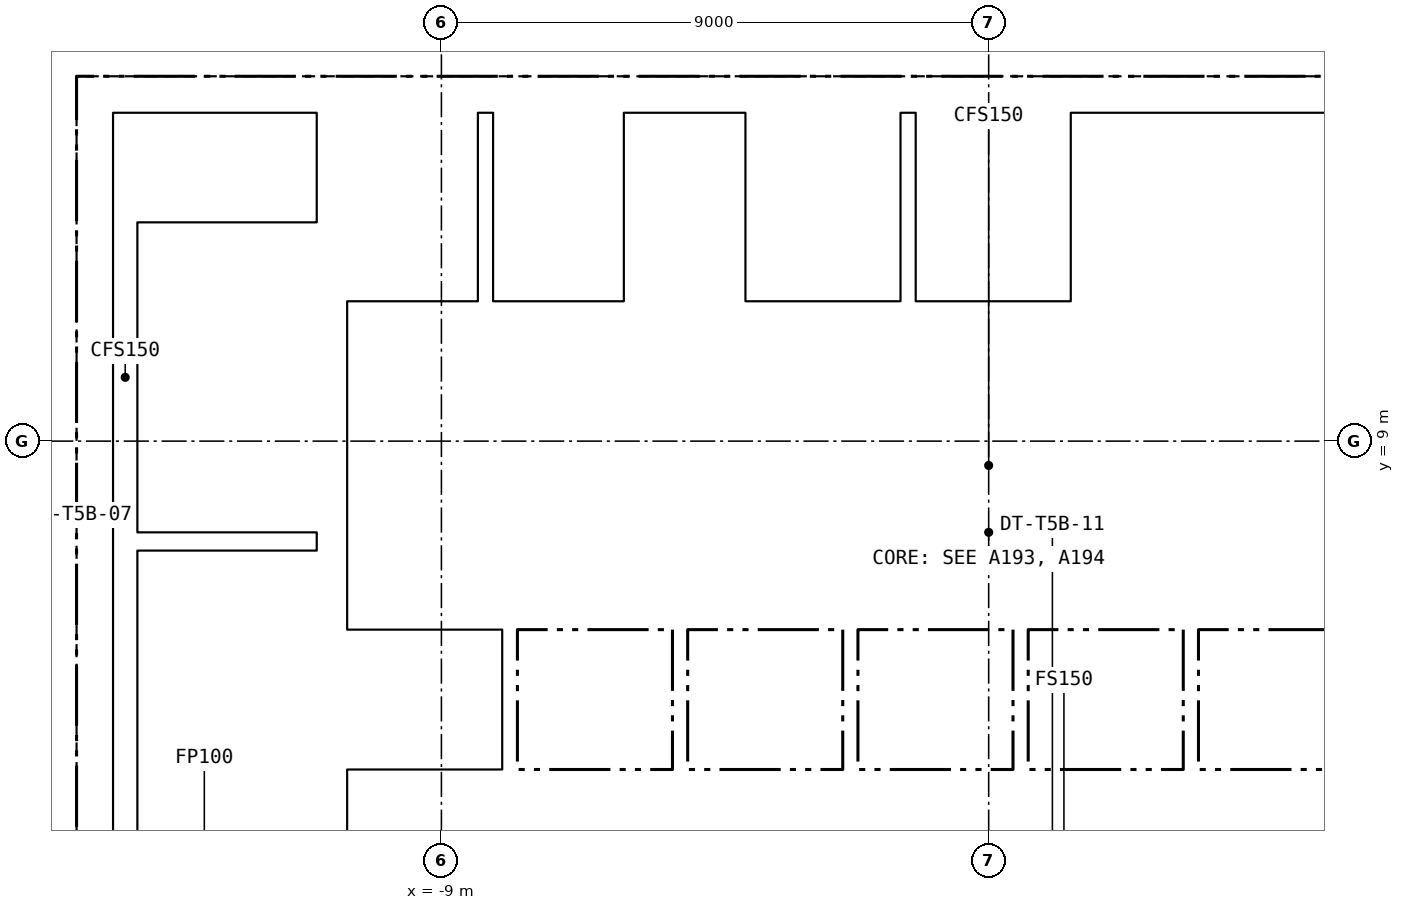
"""IFC4 building model, lengths in metres.
Left out: names, types, materials, properties, quantities, classifications, styles, units other than length and angle.
Written with IfcOpenShell. Run it as: python <this file> out.ifc"""

import sys

from ifc_helpers import new_model, si_unit, direction, frame, frame_2d, origin, place, context, subcontext, project, spatial, rectangle, extrude, element, fill, save


model = new_model("IFC4")
c1 = context("Model", 3, precision=1e-05, world=origin(), true_north=direction((0.0, 1.0)))
c2 = subcontext(c1, "Body", "Model", "MODEL_VIEW")
j1 = project(units=[si_unit("LENGTHUNIT", "METRE"), si_unit("PLANEANGLEUNIT", "RADIAN")], contexts=[c1])
p1 = place(None, origin())
s1 = spatial("IfcSite", under=j1, at=p1, CompositionType="ELEMENT")
p2 = place(p1, origin())
s2 = spatial("IfcBuilding", under=s1, at=p2, CompositionType="ELEMENT")
p3 = place(p2, frame((0.0, 0.0, 227.25)))
s3 = spatial("IfcBuildingStorey", under=s2, at=p3, CompositionType="ELEMENT", Elevation=227.25)
p4 = place(p3, frame((-15.0, 14.7, -0.15), z_axis=(0.0, 0.0, 1.0), x_axis=(1.0, 0.0, 0.0)))
e1 = element("IfcWall", 1, at=p4, inside=s3, PredefinedType="SOLIDWALL", context=c2, shape_type="SweptSolid", body=[
    extrude(rectangle(XDim=30.0, YDim=0.6, at=frame_2d((15.0, 0.0))), origin(), (0.0, 0.0, 1.0), 3.65),
])
p5 = place(p4, frame((9.25, 0.0, 0.15)))
e2 = element("IfcOpeningElement", 2, at=p5, cuts=e1, PredefinedType="OPENING", context=c2, shape_type="SweptSolid", body=[
    extrude(rectangle(XDim=1.5, YDim=2.1, at=frame_2d((0.75, 1.05))), frame((0.0, 0.31, 0.0), z_axis=(0.0, -1.0, 0.0), x_axis=(1.0, 0.0, 0.0)), (0.0, 0.0, 1.0), 0.62),
])
p6 = place(p4, frame((19.4, 0.0, 0.15)))
e3 = element("IfcOpeningElement", 3, at=p6, cuts=e1, PredefinedType="OPENING", context=c2, shape_type="SweptSolid", body=[
    extrude(rectangle(XDim=1.5, YDim=2.1, at=frame_2d((0.75, 1.05))), frame((0.0, 0.31, 0.0), z_axis=(0.0, -1.0, 0.0), x_axis=(1.0, 0.0, 0.0)), (0.0, 0.0, 1.0), 0.62),
])
p7 = place(p4, frame((1.5, 0.0, 0.15)))
e4 = element("IfcOpeningElement", 4, at=p7, cuts=e1, PredefinedType="OPENING", context=c2, shape_type="SweptSolid", body=[
    extrude(rectangle(XDim=1.2, YDim=2.1, at=frame_2d((0.6, 1.05))), frame((0.0, 0.31, 0.0), z_axis=(0.0, -1.0, 0.0), x_axis=(1.0, 0.0, 0.0)), (0.0, 0.0, 1.0), 0.62),
])
p8 = place(p4, frame((27.3, 0.0, 0.15)))
e5 = element("IfcOpeningElement", 5, at=p8, cuts=e1, PredefinedType="OPENING", context=c2, shape_type="SweptSolid", body=[
    extrude(rectangle(XDim=1.2, YDim=2.1, at=frame_2d((0.6, 1.05))), frame((0.0, 0.31, 0.0), z_axis=(0.0, -1.0, 0.0), x_axis=(1.0, 0.0, 0.0)), (0.0, 0.0, 1.0), 0.62),
])
p9 = place(p3, frame((-14.7, 0.6, -0.15), z_axis=(0.0, 0.0, 1.0), x_axis=(0.0, 1.0, 0.0)))
e6 = element("IfcWall", 6, at=p9, inside=s3, PredefinedType="SOLIDWALL", context=c2, shape_type="SweptSolid", body=[
    extrude(rectangle(XDim=13.8, YDim=0.6, at=frame_2d((6.9, 0.0))), origin(), (0.0, 0.0, 1.0), 3.65),
])
p10 = place(p3, frame((-10.8, 0.6, -0.15), z_axis=(0.0, 0.0, 1.0), x_axis=(0.0, 1.0, 0.0)))
e7 = element("IfcWall", 7, at=p10, inside=s3, PredefinedType="SOLIDWALL", context=c2, shape_type="SweptSolid", body=[
    extrude(rectangle(XDim=13.8, YDim=0.5, at=frame_2d((6.9, 0.0))), origin(), (0.0, 0.0, 1.0), 3.65),
])
p11 = place(p3, frame((-10.55, 3.5, 0.0), z_axis=(0.0, 0.0, 1.0), x_axis=(1.0, 0.0, 0.0)))
e8 = element("IfcWall", 8, at=p11, inside=s3, PredefinedType="PARTITIONING", context=c2, shape_type="SweptSolid", body=[
    extrude(rectangle(XDim=21.1, YDim=0.2, at=frame_2d((10.55, 0.0))), origin(), (0.0, 0.0, 1.0), 3.5),
])
p12 = place(p11, frame((0.675, 0.0, 0.0)))
e9 = element("IfcOpeningElement", 9, at=p12, cuts=e8, PredefinedType="OPENING", context=c2, shape_type="SweptSolid", body=[
    extrude(rectangle(XDim=1.2, YDim=2.1, at=frame_2d((0.6, 1.05))), frame((0.0, 0.11, 0.0), z_axis=(0.0, -1.0, 0.0), x_axis=(1.0, 0.0, 0.0)), (0.0, 0.0, 1.0), 0.22),
])
p13 = place(p11, frame((3.475, 0.0, 0.0)))
e10 = element("IfcOpeningElement", 10, at=p13, cuts=e8, PredefinedType="OPENING", context=c2, shape_type="SweptSolid", body=[
    extrude(rectangle(XDim=1.2, YDim=2.1, at=frame_2d((0.6, 1.05))), frame((0.0, 0.11, 0.0), z_axis=(0.0, -1.0, 0.0), x_axis=(1.0, 0.0, 0.0)), (0.0, 0.0, 1.0), 0.22),
])
p14 = place(p11, frame((6.275, 0.0, 0.0)))
e11 = element("IfcOpeningElement", 11, at=p14, cuts=e8, PredefinedType="OPENING", context=c2, shape_type="SweptSolid", body=[
    extrude(rectangle(XDim=1.2, YDim=2.1, at=frame_2d((0.6, 1.05))), frame((0.0, 0.11, 0.0), z_axis=(0.0, -1.0, 0.0), x_axis=(1.0, 0.0, 0.0)), (0.0, 0.0, 1.0), 0.22),
])
p15 = place(p11, frame((9.075, 0.0, 0.0)))
e12 = element("IfcOpeningElement", 12, at=p15, cuts=e8, PredefinedType="OPENING", context=c2, shape_type="SweptSolid", body=[
    extrude(rectangle(XDim=1.2, YDim=2.1, at=frame_2d((0.6, 1.05))), frame((0.0, 0.11, 0.0), z_axis=(0.0, -1.0, 0.0), x_axis=(1.0, 0.0, 0.0)), (0.0, 0.0, 1.0), 0.22),
])
p16 = place(p11, frame((11.875, 0.0, 0.0)))
e13 = element("IfcOpeningElement", 13, at=p16, cuts=e8, PredefinedType="OPENING", context=c2, shape_type="SweptSolid", body=[
    extrude(rectangle(XDim=1.2, YDim=2.1, at=frame_2d((0.6, 1.05))), frame((0.0, 0.11, 0.0), z_axis=(0.0, -1.0, 0.0), x_axis=(1.0, 0.0, 0.0)), (0.0, 0.0, 1.0), 0.22),
])
p17 = place(p11, frame((14.675, 0.0, 0.0)))
e14 = element("IfcOpeningElement", 14, at=p17, cuts=e8, PredefinedType="OPENING", context=c2, shape_type="SweptSolid", body=[
    extrude(rectangle(XDim=1.2, YDim=2.1, at=frame_2d((0.6, 1.05))), frame((0.0, 0.11, 0.0), z_axis=(0.0, -1.0, 0.0), x_axis=(1.0, 0.0, 0.0)), (0.0, 0.0, 1.0), 0.22),
])
p18 = place(p11, frame((17.475, 0.0, 0.0)))
e15 = element("IfcOpeningElement", 15, at=p18, cuts=e8, PredefinedType="OPENING", context=c2, shape_type="SweptSolid", body=[
    extrude(rectangle(XDim=1.2, YDim=2.1, at=frame_2d((0.6, 1.05))), frame((0.0, 0.11, 0.0), z_axis=(0.0, -1.0, 0.0), x_axis=(1.0, 0.0, 0.0)), (0.0, 0.0, 1.0), 0.22),
])
p19 = place(p11, frame((19.9, 0.0, 0.0)))
e16 = element("IfcOpeningElement", 16, at=p19, cuts=e8, PredefinedType="OPENING", context=c2, shape_type="SweptSolid", body=[
    extrude(rectangle(XDim=0.9, YDim=2.1, at=frame_2d((0.45, 1.05))), frame((0.0, 0.11, 0.0), z_axis=(0.0, -1.0, 0.0), x_axis=(1.0, 0.0, 0.0)), (0.0, 0.0, 1.0), 0.22),
])
p20 = place(p3, frame((-10.55, 6.025, 0.0), z_axis=(0.0, 0.0, 1.0), x_axis=(1.0, 0.0, 0.0)))
e17 = element("IfcWall", 17, at=p20, inside=s3, PredefinedType="PARTITIONING", context=c2, shape_type="SweptSolid", body=[
    extrude(rectangle(XDim=21.1, YDim=0.25, at=frame_2d((10.55, 0.0))), origin(), (0.0, 0.0, 1.0), 3.5),
])
p21 = place(p3, frame((-4.125, 8.55, 0.0), z_axis=(0.0, 0.0, 1.0), x_axis=(1.0, 0.0, 0.0)))
e18 = element("IfcWall", 18, at=p21, inside=s3, PredefinedType="PARTITIONING", context=c2, shape_type="SweptSolid", body=[
    extrude(rectangle(XDim=14.675, YDim=0.2, at=frame_2d((7.337, 0.0))), origin(), (0.0, 0.0, 1.0), 3.5),
])
p22 = place(p21, frame((2.438, 0.0, 0.0)))
e19 = element("IfcOpeningElement", 19, at=p22, cuts=e18, PredefinedType="OPENING", context=c2, shape_type="SweptSolid", body=[
    extrude(rectangle(XDim=1.0, YDim=2.1, at=frame_2d((0.5, 1.05))), frame((0.0, 0.11, 0.0), z_axis=(0.0, -1.0, 0.0), x_axis=(1.0, 0.0, 0.0)), (0.0, 0.0, 1.0), 0.22),
])
p23 = place(p21, frame((6.775, 0.0, 0.0)))
e20 = element("IfcOpeningElement", 20, at=p23, cuts=e18, PredefinedType="OPENING", context=c2, shape_type="SweptSolid", body=[
    extrude(rectangle(XDim=1.0, YDim=2.1, at=frame_2d((0.5, 1.05))), frame((0.0, 0.11, 0.0), z_axis=(0.0, -1.0, 0.0), x_axis=(1.0, 0.0, 0.0)), (0.0, 0.0, 1.0), 0.22),
])
p24 = place(p21, frame((10.363, 0.0, 0.0)))
e21 = element("IfcOpeningElement", 21, at=p24, cuts=e18, PredefinedType="OPENING", context=c2, shape_type="SweptSolid", body=[
    extrude(rectangle(XDim=1.0, YDim=2.1, at=frame_2d((0.5, 1.05))), frame((0.0, 0.11, 0.0), z_axis=(0.0, -1.0, 0.0), x_axis=(1.0, 0.0, 0.0)), (0.0, 0.0, 1.0), 0.22),
])
p25 = place(p21, frame((13.475, 0.0, 0.0)))
e22 = element("IfcOpeningElement", 22, at=p25, cuts=e18, PredefinedType="OPENING", context=c2, shape_type="SweptSolid", body=[
    extrude(rectangle(XDim=0.9, YDim=2.1, at=frame_2d((0.45, 1.05))), frame((0.0, 0.11, 0.0), z_axis=(0.0, -1.0, 0.0), x_axis=(1.0, 0.0, 0.0)), (0.0, 0.0, 1.0), 0.22),
])
p26 = place(p3, frame((-10.55, 11.2, 0.0), z_axis=(0.0, 0.0, 1.0), x_axis=(1.0, 0.0, 0.0)))
e23 = element("IfcWall", 23, at=p26, inside=s3, PredefinedType="PARTITIONING", context=c2, shape_type="SweptSolid", body=[
    extrude(rectangle(XDim=4.8, YDim=0.2, at=frame_2d((2.4, 0.0))), origin(), (0.0, 0.0, 1.0), 3.5),
])
p27 = place(p26, frame((0.525, 0.0, 0.0)))
e24 = element("IfcOpeningElement", 24, at=p27, cuts=e23, PredefinedType="OPENING", context=c2, shape_type="SweptSolid", body=[
    extrude(rectangle(XDim=1.1, YDim=2.1, at=frame_2d((0.55, 1.05))), frame((0.0, 0.11, 0.0), z_axis=(0.0, -1.0, 0.0), x_axis=(1.0, 0.0, 0.0)), (0.0, 0.0, 1.0), 0.22),
])
p28 = place(p26, frame((2.925, 0.0, 0.0)))
e25 = element("IfcOpeningElement", 25, at=p28, cuts=e23, PredefinedType="OPENING", context=c2, shape_type="SweptSolid", body=[
    extrude(rectangle(XDim=1.1, YDim=2.1, at=frame_2d((0.55, 1.05))), frame((0.0, 0.11, 0.0), z_axis=(0.0, -1.0, 0.0), x_axis=(1.0, 0.0, 0.0)), (0.0, 0.0, 1.0), 0.22),
])
p29 = place(p3, frame((-4.25, 11.2, 0.0), z_axis=(0.0, 0.0, 1.0), x_axis=(1.0, 0.0, 0.0)))
e26 = element("IfcWall", 26, at=p29, inside=s3, PredefinedType="PARTITIONING", context=c2, shape_type="SweptSolid", body=[
    extrude(rectangle(XDim=8.65, YDim=0.2, at=frame_2d((4.325, 0.0))), origin(), (0.0, 0.0, 1.0), 3.5),
])
p30 = place(p29, frame((0.825, 0.0, 0.0)))
e27 = element("IfcOpeningElement", 27, at=p30, cuts=e26, PredefinedType="OPENING", context=c2, shape_type="SweptSolid", body=[
    extrude(rectangle(XDim=1.4, YDim=2.1, at=frame_2d((0.7, 1.05))), frame((0.0, 0.11, 0.0), z_axis=(0.0, -1.0, 0.0), x_axis=(1.0, 0.0, 0.0)), (0.0, 0.0, 1.0), 0.22),
])
p31 = place(p29, frame((3.625, 0.0, 0.0)))
e28 = element("IfcOpeningElement", 28, at=p31, cuts=e26, PredefinedType="OPENING", context=c2, shape_type="SweptSolid", body=[
    extrude(rectangle(XDim=1.4, YDim=2.1, at=frame_2d((0.7, 1.05))), frame((0.0, 0.11, 0.0), z_axis=(0.0, -1.0, 0.0), x_axis=(1.0, 0.0, 0.0)), (0.0, 0.0, 1.0), 0.22),
])
p32 = place(p29, frame((6.675, 0.0, 0.0)))
e29 = element("IfcOpeningElement", 29, at=p32, cuts=e26, PredefinedType="OPENING", context=c2, shape_type="SweptSolid", body=[
    extrude(rectangle(XDim=0.9, YDim=2.1, at=frame_2d((0.45, 1.05))), frame((0.0, 0.11, 0.0), z_axis=(0.0, -1.0, 0.0), x_axis=(1.0, 0.0, 0.0)), (0.0, 0.0, 1.0), 0.22),
])
p33 = place(p3, frame((-4.125, 6.15, 0.0), z_axis=(0.0, 0.0, 1.0), x_axis=(0.0, 1.0, 0.0)))
e30 = element("IfcWall", 30, at=p33, inside=s3, PredefinedType="PARTITIONING", context=c2, shape_type="SweptSolid", body=[
    extrude(rectangle(XDim=4.95, YDim=0.25, at=frame_2d((2.475, 0.0))), origin(), (0.0, 0.0, 1.0), 3.5),
])
p34 = place(p33, frame((3.125, 0.0, 0.0)))
e31 = element("IfcOpeningElement", 31, at=p34, cuts=e30, PredefinedType="OPENING", context=c2, shape_type="SweptSolid", body=[
    extrude(rectangle(XDim=1.2, YDim=2.1, at=frame_2d((0.6, 1.05))), frame((0.0, 0.135, 0.0), z_axis=(0.0, -1.0, 0.0), x_axis=(1.0, 0.0, 0.0)), (0.0, 0.0, 1.0), 0.27),
])
for number, where, z_axis, x_axis in (
    (32, (-7.875, 3.6, 0.0), (0.0, 0.0, 1.0), (0.0, 1.0, 0.0)),
    (33, (-5.075, 3.6, 0.0), (0.0, 0.0, 1.0), (0.0, 1.0, 0.0)),
    (34, (-2.275, 3.6, 0.0), (0.0, 0.0, 1.0), (0.0, 1.0, 0.0)),
    (35, (0.525, 3.6, 0.0), (0.0, 0.0, 1.0), (0.0, 1.0, 0.0)),
    (36, (3.325, 3.6, 0.0), (0.0, 0.0, 1.0), (0.0, 1.0, 0.0)),
):
    element("IfcWall", number, at=place(p3, frame(where, z_axis=z_axis, x_axis=x_axis)), inside=s3, PredefinedType="PARTITIONING", context=c2, shape_type="SweptSolid", body=[
        extrude(rectangle(XDim=2.3, YDim=0.25, at=frame_2d((1.15, 0.0))), origin(), (0.0, 0.0, 1.0), 3.5),
    ])
for number, where, z_axis, x_axis in (
    (37, (1.7, 6.15, 0.0), (0.0, 0.0, 1.0), (0.0, 1.0, 0.0)),
    (38, (4.6, 6.15, 0.0), (0.0, 0.0, 1.0), (0.0, 1.0, 0.0)),
):
    element("IfcWall", number, at=place(p3, frame(where, z_axis=z_axis, x_axis=x_axis)), inside=s3, PredefinedType="PARTITIONING", context=c2, shape_type="SweptSolid", body=[
        extrude(rectangle(XDim=2.3, YDim=0.15, at=frame_2d((1.15, 0.0))), origin(), (0.0, 0.0, 1.0), 3.5),
    ])
for number, where, z_axis, x_axis in (
    (39, (-8.275, 11.3, 0.0), (0.0, 0.0, 1.0), (0.0, 1.0, 0.0)),
    (40, (-5.875, 11.3, 0.0), (0.0, 0.0, 1.0), (0.0, 1.0, 0.0)),
    (41, (-4.125, 11.3, 0.0), (0.0, 0.0, 1.0), (0.0, 1.0, 0.0)),
    (42, (-1.325, 11.3, 0.0), (0.0, 0.0, 1.0), (0.0, 1.0, 0.0)),
    (43, (1.475, 11.3, 0.0), (0.0, 0.0, 1.0), (0.0, 1.0, 0.0)),
    (44, (4.275, 11.3, 0.0), (0.0, 0.0, 1.0), (0.0, 1.0, 0.0)),
):
    element("IfcWall", number, at=place(p3, frame(where, z_axis=z_axis, x_axis=x_axis)), inside=s3, PredefinedType="PARTITIONING", context=c2, shape_type="SweptSolid", body=[
        extrude(rectangle(XDim=3.1, YDim=0.25, at=frame_2d((1.55, 0.0))), origin(), (0.0, 0.0, 1.0), 3.5),
    ])
p35 = place(p3, frame((-14.0, 7.35, 0.0), z_axis=(0.0, 0.0, 1.0), x_axis=(1.0, 0.0, 0.0)))
e45 = element("IfcWall", 45, at=p35, inside=s3, PredefinedType="SOLIDWALL", context=c2, shape_type="SweptSolid", body=[
    extrude(rectangle(XDim=2.95, YDim=0.3, at=frame_2d((1.475, 0.0))), origin(), (0.0, 0.0, 1.0), 3.5),
])
p36 = place(p3, frame((-14.2, 0.6, 0.0), z_axis=(0.0, 0.0, 1.0), x_axis=(0.0, 1.0, 0.0)))
e46 = element("IfcWall", 46, at=p36, inside=s3, PredefinedType="SOLIDWALL", context=c2, shape_type="SweptSolid", body=[
    extrude(rectangle(XDim=13.8, YDim=0.4, at=frame_2d((6.9, 0.0))), origin(), (0.0, 0.0, 1.0), 3.5),
])
p37 = place(p34, origin())
e47 = element("IfcDoor", 47, at=p37, inside=s3, OperationType="SINGLE_SWING_LEFT", PredefinedType="DOOR", context=c2, shape_type="SweptSolid", body=[
    extrude(rectangle(XDim=1.2, YDim=2.1, at=frame_2d((0.6, 1.05))), frame((0.0, 0.025, 0.0), z_axis=(0.0, -1.0, 0.0), x_axis=(1.0, 0.0, 0.0)), (0.0, 0.0, 1.0), 0.05),
])
fill(e31, e47)
p38 = place(p12, origin())
e48 = element("IfcDoor", 48, at=p38, inside=s3, OperationType="DOUBLE_DOOR_SLIDING", PredefinedType="DOOR", context=c2, shape_type="SweptSolid", body=[
    extrude(rectangle(XDim=1.2, YDim=2.1, at=frame_2d((0.6, 1.05))), frame((0.0, 0.025, 0.0), z_axis=(0.0, -1.0, 0.0), x_axis=(1.0, 0.0, 0.0)), (0.0, 0.0, 1.0), 0.05),
])
fill(e9, e48)
p39 = place(p13, origin())
e49 = element("IfcDoor", 49, at=p39, inside=s3, OperationType="DOUBLE_DOOR_SLIDING", PredefinedType="DOOR", context=c2, shape_type="SweptSolid", body=[
    extrude(rectangle(XDim=1.2, YDim=2.1, at=frame_2d((0.6, 1.05))), frame((0.0, 0.025, 0.0), z_axis=(0.0, -1.0, 0.0), x_axis=(1.0, 0.0, 0.0)), (0.0, 0.0, 1.0), 0.05),
])
fill(e10, e49)
p40 = place(p14, origin())
e50 = element("IfcDoor", 50, at=p40, inside=s3, OperationType="DOUBLE_DOOR_SLIDING", PredefinedType="DOOR", context=c2, shape_type="SweptSolid", body=[
    extrude(rectangle(XDim=1.2, YDim=2.1, at=frame_2d((0.6, 1.05))), frame((0.0, 0.025, 0.0), z_axis=(0.0, -1.0, 0.0), x_axis=(1.0, 0.0, 0.0)), (0.0, 0.0, 1.0), 0.05),
])
fill(e11, e50)
p41 = place(p15, origin())
e51 = element("IfcDoor", 51, at=p41, inside=s3, OperationType="DOUBLE_DOOR_SLIDING", PredefinedType="DOOR", context=c2, shape_type="SweptSolid", body=[
    extrude(rectangle(XDim=1.2, YDim=2.1, at=frame_2d((0.6, 1.05))), frame((0.0, 0.025, 0.0), z_axis=(0.0, -1.0, 0.0), x_axis=(1.0, 0.0, 0.0)), (0.0, 0.0, 1.0), 0.05),
])
fill(e12, e51)
p42 = place(p16, origin())
e52 = element("IfcDoor", 52, at=p42, inside=s3, OperationType="DOUBLE_DOOR_SLIDING", PredefinedType="DOOR", context=c2, shape_type="SweptSolid", body=[
    extrude(rectangle(XDim=1.2, YDim=2.1, at=frame_2d((0.6, 1.05))), frame((0.0, 0.025, 0.0), z_axis=(0.0, -1.0, 0.0), x_axis=(1.0, 0.0, 0.0)), (0.0, 0.0, 1.0), 0.05),
])
fill(e13, e52)
p43 = place(p17, origin())
e53 = element("IfcDoor", 53, at=p43, inside=s3, OperationType="DOUBLE_DOOR_SLIDING", PredefinedType="DOOR", context=c2, shape_type="SweptSolid", body=[
    extrude(rectangle(XDim=1.2, YDim=2.1, at=frame_2d((0.6, 1.05))), frame((0.0, 0.025, 0.0), z_axis=(0.0, -1.0, 0.0), x_axis=(1.0, 0.0, 0.0)), (0.0, 0.0, 1.0), 0.05),
])
fill(e14, e53)
p44 = place(p22, origin())
e54 = element("IfcDoor", 54, at=p44, inside=s3, OperationType="SINGLE_SWING_LEFT", PredefinedType="DOOR", context=c2, shape_type="SweptSolid", body=[
    extrude(rectangle(XDim=1.0, YDim=2.1, at=frame_2d((0.5, 1.05))), frame((0.0, 0.025, 0.0), z_axis=(0.0, -1.0, 0.0), x_axis=(1.0, 0.0, 0.0)), (0.0, 0.0, 1.0), 0.05),
])
fill(e19, e54)
p45 = place(p23, origin())
e55 = element("IfcDoor", 55, at=p45, inside=s3, OperationType="SINGLE_SWING_RIGHT", PredefinedType="DOOR", context=c2, shape_type="SweptSolid", body=[
    extrude(rectangle(XDim=1.0, YDim=2.1, at=frame_2d((0.5, 1.05))), frame((0.0, 0.025, 0.0), z_axis=(0.0, -1.0, 0.0), x_axis=(1.0, 0.0, 0.0)), (0.0, 0.0, 1.0), 0.05),
])
fill(e20, e55)
p46 = place(p27, origin())
e56 = element("IfcDoor", 56, at=p46, inside=s3, OperationType="DOUBLE_DOOR_SLIDING", PredefinedType="DOOR", context=c2, shape_type="SweptSolid", body=[
    extrude(rectangle(XDim=1.1, YDim=2.1, at=frame_2d((0.55, 1.05))), frame((0.0, 0.025, 0.0), z_axis=(0.0, -1.0, 0.0), x_axis=(1.0, 0.0, 0.0)), (0.0, 0.0, 1.0), 0.05),
])
fill(e24, e56)
p47 = place(p28, origin())
e57 = element("IfcDoor", 57, at=p47, inside=s3, OperationType="DOUBLE_DOOR_SLIDING", PredefinedType="DOOR", context=c2, shape_type="SweptSolid", body=[
    extrude(rectangle(XDim=1.1, YDim=2.1, at=frame_2d((0.55, 1.05))), frame((0.0, 0.025, 0.0), z_axis=(0.0, -1.0, 0.0), x_axis=(1.0, 0.0, 0.0)), (0.0, 0.0, 1.0), 0.05),
])
fill(e25, e57)
p48 = place(p30, origin())
e58 = element("IfcDoor", 58, at=p48, inside=s3, OperationType="DOUBLE_DOOR_SLIDING", PredefinedType="DOOR", context=c2, shape_type="SweptSolid", body=[
    extrude(rectangle(XDim=1.4, YDim=2.1, at=frame_2d((0.7, 1.05))), frame((0.0, 0.025, 0.0), z_axis=(0.0, -1.0, 0.0), x_axis=(1.0, 0.0, 0.0)), (0.0, 0.0, 1.0), 0.05),
])
fill(e27, e58)
p49 = place(p31, origin())
e59 = element("IfcDoor", 59, at=p49, inside=s3, OperationType="DOUBLE_DOOR_SLIDING", PredefinedType="DOOR", context=c2, shape_type="SweptSolid", body=[
    extrude(rectangle(XDim=1.4, YDim=2.1, at=frame_2d((0.7, 1.05))), frame((0.0, 0.025, 0.0), z_axis=(0.0, -1.0, 0.0), x_axis=(1.0, 0.0, 0.0)), (0.0, 0.0, 1.0), 0.05),
])
fill(e28, e59)
p50 = place(p32, origin())
e60 = element("IfcDoor", 60, at=p50, inside=s3, OperationType="SINGLE_SWING_LEFT", PredefinedType="DOOR", context=c2, shape_type="SweptSolid", body=[
    extrude(rectangle(XDim=0.9, YDim=2.1, at=frame_2d((0.45, 1.05))), frame((0.0, 0.025, 0.0), z_axis=(0.0, -1.0, 0.0), x_axis=(1.0, 0.0, 0.0)), (0.0, 0.0, 1.0), 0.05),
])
fill(e29, e60)
p51 = place(p5, origin())
e61 = element("IfcDoor", 61, at=p51, inside=s3, OperationType="DOUBLE_DOOR_SINGLE_SWING", PredefinedType="DOOR", context=c2, shape_type="SweptSolid", body=[
    extrude(rectangle(XDim=1.5, YDim=2.1, at=frame_2d((0.75, 1.05))), frame((0.0, 0.025, 0.0), z_axis=(0.0, -1.0, 0.0), x_axis=(1.0, 0.0, 0.0)), (0.0, 0.0, 1.0), 0.05),
])
fill(e2, e61)
p52 = place(p6, origin())
e62 = element("IfcDoor", 62, at=p52, inside=s3, OperationType="DOUBLE_DOOR_SINGLE_SWING", PredefinedType="DOOR", context=c2, shape_type="SweptSolid", body=[
    extrude(rectangle(XDim=1.5, YDim=2.1, at=frame_2d((0.75, 1.05))), frame((0.0, 0.025, 0.0), z_axis=(0.0, -1.0, 0.0), x_axis=(1.0, 0.0, 0.0)), (0.0, 0.0, 1.0), 0.05),
])
fill(e3, e62)
p53 = place(p7, origin())
e63 = element("IfcDoor", 63, at=p53, inside=s3, OperationType="SINGLE_SWING_RIGHT", PredefinedType="DOOR", context=c2, shape_type="SweptSolid", body=[
    extrude(rectangle(XDim=1.2, YDim=2.1, at=frame_2d((0.6, 1.05))), frame((0.0, 0.025, 0.0), z_axis=(0.0, -1.0, 0.0), x_axis=(1.0, 0.0, 0.0)), (0.0, 0.0, 1.0), 0.05),
])
fill(e4, e63)
save(model, sys.argv[1])
